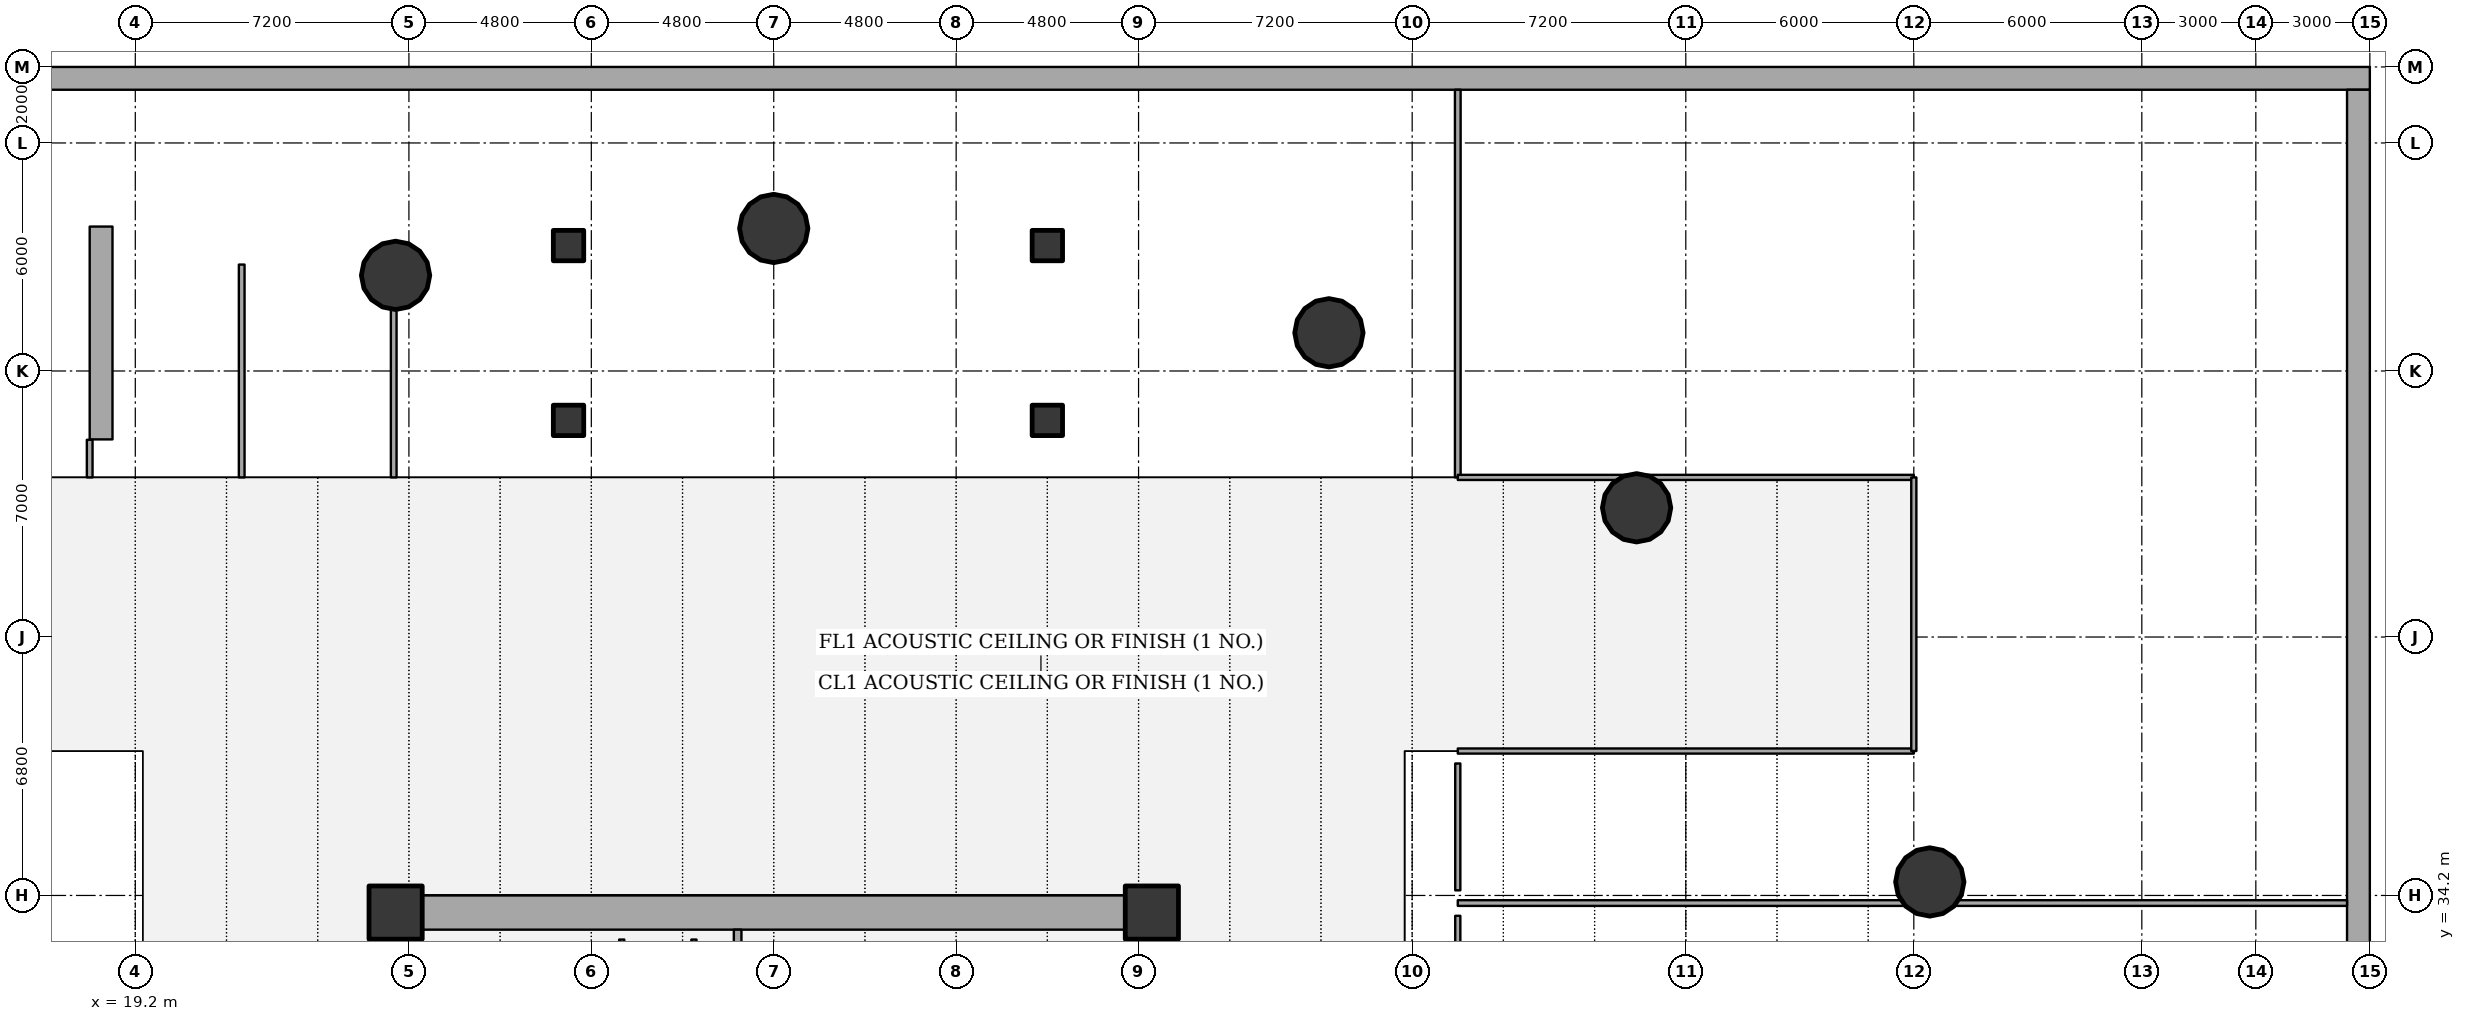
"""IFC4 building model, lengths in metres.
Left out: names, types, materials, properties, quantities, classifications, styles, units other than length and angle.
Written with IfcOpenShell. Run it as: python <this file> out.ifc"""

import sys

from ifc_helpers import new_model, si_unit, direction, frame, frame_2d, origin, origin_2d, place, context, subcontext, project, spatial, rectangle, hollow_circle, extrude, source, transform, mapped, element, fill, save


model = new_model("IFC4")
c1 = context("Model", 3, precision=1e-05, world=origin(), true_north=direction((0.0, 1.0)))
c2 = subcontext(c1, "Body", "Model", "MODEL_VIEW")
j1 = project(units=[si_unit("LENGTHUNIT", "METRE"), si_unit("PLANEANGLEUNIT", "RADIAN")], contexts=[c1])
p1 = place(None, origin())
s1 = spatial("IfcSite", under=j1, at=p1, CompositionType="ELEMENT")
p2 = place(p1, origin())
s2 = spatial("IfcBuilding", under=s1, at=p2, CompositionType="ELEMENT")
p3 = place(p2, frame((0.0, 0.0, -9.0)))
s3 = spatial("IfcBuildingStorey", under=s2, at=p3, CompositionType="ELEMENT", Elevation=-9.0)
p4 = place(p3, frame((18.3, 46.2, 0.0), z_axis=(0.0, 0.0, 1.0), x_axis=(0.0, 1.0, 0.0)))
e1 = element("IfcWall", 1, at=p4, inside=s3, PredefinedType="SHEAR", context=c2, shape_type="SweptSolid", body=[
    extrude(rectangle(XDim=5.6, YDim=0.6, at=frame_2d((2.8, 0.0))), origin(), (0.0, 0.0, 1.0), 4.55),
])
for number, where, z_axis, x_axis in (
    (2, (30.6, 46.7, 0.0), (0.0, 0.0, 1.0), (1.0, 0.0, 0.0)),
    (3, (30.6, 51.3, 0.0), (0.0, 0.0, 1.0), (1.0, 0.0, 0.0)),
    (4, (43.2, 46.7, 0.0), (0.0, 0.0, 1.0), (1.0, 0.0, 0.0)),
    (5, (43.2, 51.3, 0.0), (0.0, 0.0, 1.0), (1.0, 0.0, 0.0)),
):
    element("IfcColumn", number, at=place(p3, frame(where, z_axis=z_axis, x_axis=x_axis)), inside=s3, PredefinedType="COLUMN", context=c2, shape_type="SweptSolid", body=[
        extrude(rectangle(XDim=0.8, YDim=0.8, at=origin_2d()), origin(), (0.0, 0.0, 1.0), 4.5),
    ])
p5 = place(p3, frame((-6.0, 55.7, 0.0), z_axis=(0.0, 0.0, 1.0), x_axis=(1.0, 0.0, 0.0)))
e6 = element("IfcWall", 6, at=p5, inside=s3, PredefinedType="SHEAR", context=c2, shape_type="SweptSolid", body=[
    extrude(rectangle(XDim=84.0, YDim=0.6, at=frame_2d((42.0, 0.0))), origin(), (0.0, 0.0, 1.0), 4.2),
])
p6 = place(p3, frame((77.7, 55.4, 0.0), z_axis=(0.0, 0.0, 1.0), x_axis=(0.0, -1.0, 0.0)))
e7 = element("IfcWall", 7, at=p6, inside=s3, PredefinedType="SHEAR", context=c2, shape_type="SweptSolid", body=[
    extrude(rectangle(XDim=56.8, YDim=0.6, at=frame_2d((28.4, 0.0))), origin(), (0.0, 0.0, 1.0), 4.2),
])
for number, where, z_axis, x_axis in (
    (8, (45.95, 33.75, 0.0), (0.0, 0.0, 1.0), (1.0, 0.0, 0.0)),
    (9, (26.05, 33.75, 0.0), (0.0, 0.0, 1.0), (1.0, 0.0, 0.0)),
):
    element("IfcColumn", number, at=place(p3, frame(where, z_axis=z_axis, x_axis=x_axis)), inside=s3, PredefinedType="COLUMN", context=c2, shape_type="SweptSolid", body=[
        extrude(rectangle(XDim=1.4, YDim=1.4, at=origin_2d()), origin(), (0.0, 0.0, 1.0), 4.5),
    ])
p7 = place(p3, frame((26.75, 33.75, 0.0), z_axis=(0.0, 0.0, 1.0), x_axis=(1.0, 0.0, 0.0)))
e10 = element("IfcWall", 10, at=p7, inside=s3, PredefinedType="SHEAR", context=c2, shape_type="SweptSolid", body=[
    extrude(rectangle(XDim=18.5, YDim=0.9, at=frame_2d((9.25, 0.0))), origin(), (0.0, 0.0, 1.0), 3.65),
])
p8 = place(p3, frame((45.95, 33.05, 0.0), z_axis=(0.0, 0.0, 1.0), x_axis=(0.0, -1.0, 0.0)))
e11 = element("IfcWall", 11, at=p8, inside=s3, PredefinedType="SHEAR", context=c2, shape_type="SweptSolid", body=[
    extrude(rectangle(XDim=12.1, YDim=0.9, at=frame_2d((6.05, 0.0))), origin(), (0.0, 0.0, 1.0), 3.65),
])
p9 = place(p8, frame((5.64, 0.0, 0.0)))
e12 = element("IfcOpeningElement", 12, at=p9, cuts=e11, PredefinedType="OPENING", context=c2, shape_type="SweptSolid", body=[
    extrude(rectangle(XDim=0.82, YDim=2.1, at=origin_2d()), frame((0.41, 0.46, 1.05), z_axis=(0.0, -1.0, 0.0), x_axis=(1.0, 0.0, 0.0)), (0.0, 0.0, 1.0), 0.92),
])
p10 = place(p3, frame((26.05, 20.95, 0.0), z_axis=(0.0, 0.0, 1.0), x_axis=(0.0, 1.0, 0.0)))
e13 = element("IfcWall", 13, at=p10, inside=s3, PredefinedType="SHEAR", context=c2, shape_type="SweptSolid", body=[
    extrude(rectangle(XDim=12.1, YDim=0.9, at=frame_2d((6.05, 0.0))), origin(), (0.0, 0.0, 1.0), 3.65),
])
p11 = place(p10, frame((5.64, 0.0, 0.0)))
e14 = element("IfcOpeningElement", 14, at=p11, cuts=e13, PredefinedType="OPENING", context=c2, shape_type="SweptSolid", body=[
    extrude(rectangle(XDim=0.82, YDim=2.1, at=origin_2d()), frame((0.41, 0.46, 1.05), z_axis=(0.0, -1.0, 0.0), x_axis=(1.0, 0.0, 0.0)), (0.0, 0.0, 1.0), 0.92),
])
for number, where, z_axis, x_axis in (
    (15, (66.42, 34.555, 0.0), (0.0, 0.0, 1.0), (1.0, 0.0, 0.0)),
    (16, (58.705, 44.401, 0.0), (0.0, 0.0, 1.0), (1.0, 0.0, 0.0)),
    (17, (50.609, 49.005, 0.0), (0.0, 0.0, 1.0), (1.0, 0.0, 0.0)),
    (18, (36.0, 51.75, 0.0), (0.0, 0.0, 1.0), (1.0, 0.0, 0.0)),
    (19, (26.049, 50.516, 0.0), (0.0, 0.0, 1.0), (1.0, 0.0, 0.0)),
):
    element("IfcColumn", number, at=place(p3, frame(where, z_axis=z_axis, x_axis=x_axis)), inside=s3, PredefinedType="COLUMN", context=c2, shape_type="SweptSolid", body=[
        extrude(hollow_circle(Radius=0.9, WallThickness=0.05, at=origin_2d()), origin(), (0.0, 0.0, 1.0), 4.5),
    ])
p12 = place(p3, frame((18.0, 45.2, 0.0), z_axis=(0.0, 0.0, 1.0), x_axis=(0.0, 1.0, 0.0)))
e20 = element("IfcWall", 20, at=p12, inside=s3, PredefinedType="PARTITIONING", context=c2, shape_type="SweptSolid", body=[
    extrude(rectangle(XDim=0.99, YDim=0.15, at=frame_2d((0.495, 0.0))), origin(), (0.0, 0.0, 1.0), 4.2),
])
p13 = place(p3, frame((22.0, 45.2, 0.0), z_axis=(0.0, 0.0, 1.0), x_axis=(0.0, 1.0, 0.0)))
e21 = element("IfcWall", 21, at=p13, inside=s3, PredefinedType="PARTITIONING", context=c2, shape_type="SweptSolid", body=[
    extrude(rectangle(XDim=5.6, YDim=0.15, at=frame_2d((2.8, 0.0))), origin(), (0.0, 0.0, 1.0), 3.585),
])
p14 = place(p3, frame((26.0, 45.2, 0.0), z_axis=(0.0, 0.0, 1.0), x_axis=(0.0, 1.0, 0.0)))
e22 = element("IfcWall", 22, at=p14, inside=s3, PredefinedType="PARTITIONING", context=c2, shape_type="SweptSolid", body=[
    extrude(rectangle(XDim=5.6, YDim=0.15, at=frame_2d((2.8, 0.0))), origin(), (0.0, 0.0, 1.0), 3.385),
])
p15 = place(p3, frame((35.05, 31.05, 0.0), z_axis=(0.0, 0.0, 1.0), x_axis=(0.0, 1.0, 0.0)))
e23 = element("IfcWall", 23, at=p15, inside=s3, PredefinedType="PARTITIONING", context=c2, shape_type="SweptSolid", body=[
    extrude(rectangle(XDim=2.25, YDim=0.2, at=frame_2d((1.125, 0.0))), origin(), (0.0, 0.0, 1.0), 3.785),
])
p16 = place(p3, frame((54.0, 34.0, 0.0), z_axis=(0.0, 0.0, 1.0), x_axis=(1.0, 0.0, 0.0)))
e24 = element("IfcWall", 24, at=p16, inside=s3, PredefinedType="PARTITIONING", context=c2, shape_type="SweptSolid", body=[
    extrude(rectangle(XDim=23.4, YDim=0.15, at=frame_2d((11.7, 0.0))), origin(), (0.0, 0.0, 1.0), 3.385),
])
p17 = place(p3, frame((54.0, 38.0, 0.0), z_axis=(0.0, 0.0, 1.0), x_axis=(1.0, 0.0, 0.0)))
e25 = element("IfcWall", 25, at=p17, inside=s3, PredefinedType="PARTITIONING", context=c2, shape_type="SweptSolid", body=[
    extrude(rectangle(XDim=12.0, YDim=0.135, at=frame_2d((6.0, 0.0))), origin(), (0.0, 0.0, 1.0), 3.585),
])
p18 = place(p17, frame((5.45, 0.0, 0.0)))
e26 = element("IfcOpeningElement", 26, at=p18, cuts=e25, PredefinedType="OPENING", context=c2, shape_type="SweptSolid", body=[
    extrude(rectangle(XDim=1.1, YDim=2.15, at=origin_2d()), frame((0.55, 0.078, 1.075), z_axis=(0.0, -1.0, 0.0), x_axis=(1.0, 0.0, 0.0)), (0.0, 0.0, 1.0), 0.155),
])
p19 = place(p3, frame((54.0, 45.2, 0.0), z_axis=(0.0, 0.0, 1.0), x_axis=(0.0, 1.0, 0.0)))
e27 = element("IfcWall", 27, at=p19, inside=s3, PredefinedType="PARTITIONING", context=c2, shape_type="SweptSolid", body=[
    extrude(rectangle(XDim=10.2, YDim=0.15, at=frame_2d((5.1, 0.0))), origin(), (0.0, 0.0, 1.0), 3.385),
])
p20 = place(p3, frame((54.0, 45.2, 0.0), z_axis=(0.0, 0.0, 1.0), x_axis=(1.0, 0.0, 0.0)))
e28 = element("IfcWall", 28, at=p20, inside=s3, PredefinedType="PARTITIONING", context=c2, shape_type="SweptSolid", body=[
    extrude(rectangle(XDim=12.0, YDim=0.135, at=frame_2d((6.0, 0.0))), origin(), (0.0, 0.0, 1.0), 3.385),
])
p21 = place(p3, frame((66.0, 38.0, 0.0), z_axis=(0.0, 0.0, 1.0), x_axis=(0.0, 1.0, 0.0)))
e29 = element("IfcWall", 29, at=p21, inside=s3, PredefinedType="PARTITIONING", context=c2, shape_type="SweptSolid", body=[
    extrude(rectangle(XDim=7.2, YDim=0.135, at=frame_2d((3.6, 0.0))), origin(), (0.0, 0.0, 1.0), 4.2),
])
p22 = place(p3, frame((32.0, 33.04, 0.0), z_axis=(0.0, 0.0, 1.0), x_axis=(0.0, -1.0, 0.0)))
e30 = element("IfcWall", 30, at=p22, inside=s3, PredefinedType="PARTITIONING", context=c2, shape_type="SweptSolid", body=[
    extrude(rectangle(XDim=5.48, YDim=0.135, at=frame_2d((2.74, 0.0))), origin(), (0.0, 0.0, 1.0), 3.735),
])
p23 = place(p3, frame((33.9, 27.56, 0.0), z_axis=(0.0, 0.0, 1.0), x_axis=(0.0, 1.0, 0.0)))
e31 = element("IfcWall", 31, at=p23, inside=s3, PredefinedType="PARTITIONING", context=c2, shape_type="SweptSolid", body=[
    extrude(rectangle(XDim=5.48, YDim=0.135, at=frame_2d((2.74, 0.0))), origin(), (0.0, 0.0, 1.0), 3.785),
])
p24 = place(p3, frame((54.0, 16.327, 0.0), z_axis=(0.0, 0.0, 1.0), x_axis=(0.0, 1.0, 0.0)))
e32 = element("IfcWall", 32, at=p24, inside=s3, PredefinedType="PARTITIONING", context=c2, shape_type="SweptSolid", body=[
    extrude(rectangle(XDim=17.338, YDim=0.135, at=frame_2d((8.669, 0.0))), origin(), (0.0, 0.0, 1.0), 3.385),
])
p25 = place(p3, frame((54.0, 34.335, 0.0), z_axis=(0.0, 0.0, 1.0), x_axis=(0.0, 1.0, 0.0)))
e33 = element("IfcWall", 33, at=p25, inside=s3, PredefinedType="PARTITIONING", context=c2, shape_type="SweptSolid", body=[
    extrude(rectangle(XDim=3.338, YDim=0.135, at=frame_2d((1.669, 0.0))), origin(), (0.0, 0.0, 1.0), 4.2),
])
m1 = source(origin(), c2, "Body", "SweptSolid", [
    extrude(rectangle(XDim=1.1, YDim=2.15, at=origin_2d()), frame((0.55, 0.025, 1.075), z_axis=(0.0, -1.0, 0.0), x_axis=(1.0, 0.0, 0.0)), (0.0, 0.0, 1.0), 0.05),
])
p26 = place(p18, origin())
e34 = element("IfcDoor", 34, at=p26, inside=s3, OperationType="SINGLE_SWING_RIGHT", PredefinedType="DOOR", context=c2, shape_type="MappedRepresentation", body=[
    mapped(m1, transform((0.0, 0.0, 0.0), x_axis=(1.0, 0.0, 0.0), y_axis=(0.0, 1.0, 0.0), z_axis=(0.0, 0.0, 1.0), scale=1.0)),
])
fill(e26, e34)
save(model, sys.argv[1])
